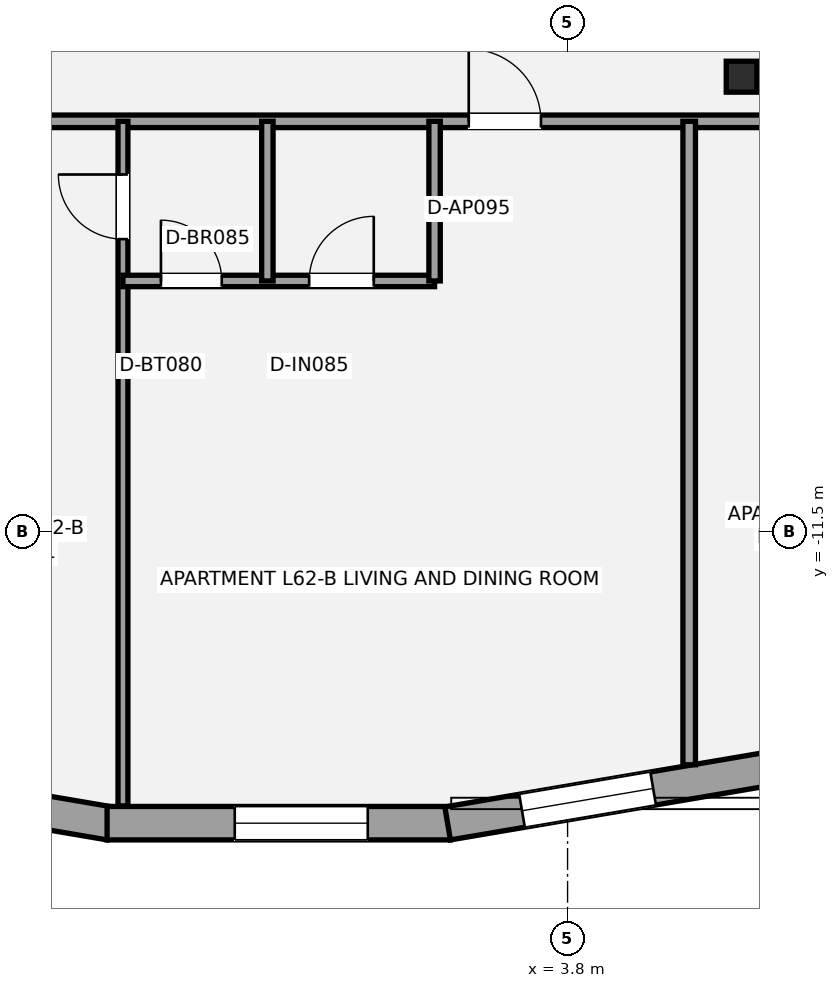
"""IFC4 building model, lengths in metres.
Left out: names, types, materials, properties, quantities, classifications, styles, units other than length and angle.
Written with IfcOpenShell. Run it as: python <this file> out.ifc"""

import sys

from ifc_helpers import new_model, si_unit, direction, frame, frame_2d, origin, origin_2d, place, context, subcontext, project, spatial, rectangle, i_section, extrude, element, fill, save


model = new_model("IFC4")
c1 = context("Model", 3, precision=1e-05, world=origin(), true_north=direction((0.0, 1.0)))
c2 = subcontext(c1, "Body", "Model", "MODEL_VIEW")
j1 = project(units=[si_unit("LENGTHUNIT", "METRE"), si_unit("PLANEANGLEUNIT", "RADIAN")], contexts=[c1])
p1 = place(None, origin())
s1 = spatial("IfcSite", under=j1, at=p1, CompositionType="ELEMENT")
p2 = place(p1, origin())
s2 = spatial("IfcBuilding", under=s1, at=p2, CompositionType="ELEMENT")
p3 = place(p2, frame((0.0, 0.0, 222.6)))
s3 = spatial("IfcBuildingStorey", under=s2, at=p3, CompositionType="ELEMENT", Elevation=222.6)
p4 = place(p3, frame((6.09, -5.513, 0.0), z_axis=(0.0, 0.0, 1.0), x_axis=(1.0, 0.0, 0.0)))
e1 = element("IfcColumn", 1, at=p4, inside=s3, PredefinedType="COLUMN", context=c2, shape_type="SweptSolid", body=[
    extrude(i_section(OverallWidth=0.404, OverallDepth=0.407, WebThickness=0.027, FlangeThickness=0.044, at=origin_2d()), origin(), (0.0, 0.0, 1.0), 3.15),
])
p5 = place(p3, frame((-2.222, -15.337, 0.0), z_axis=(0.0, 0.0, 1.0), x_axis=(-0.985849288176, 0.16763406874, 0.0)))
e2 = element("IfcWall", 2, at=p5, inside=s3, PredefinedType="STANDARD", context=c2, shape_type="SweptSolid", body=[
    extrude(rectangle(XDim=4.429, YDim=0.44, at=frame_2d((2.214, 0.0))), origin(), (0.0, 0.0, 1.0), 2.336),
])
p6 = place(p5, frame((1.764, 0.0, 0.58)))
e3 = element("IfcOpeningElement", 3, at=p6, cuts=e2, PredefinedType="OPENING", context=c2, shape_type="SweptSolid", body=[
    extrude(rectangle(XDim=0.9, YDim=1.35, at=frame_2d((0.45, 0.675))), frame((0.0, 0.23, 0.0), z_axis=(0.0, -1.0, 0.0), x_axis=(1.0, 0.0, 0.0)), (0.0, 0.0, 1.0), 0.46),
])
p7 = place(p3, frame((2.259, -15.334, 0.0), z_axis=(0.0, 0.0, 1.0), x_axis=(-1.0, 0.0, 0.0)))
e4 = element("IfcWall", 4, at=p7, inside=s3, PredefinedType="STANDARD", context=c2, shape_type="SweptSolid", body=[
    extrude(rectangle(XDim=4.518, YDim=0.44, at=frame_2d((2.259, 0.0))), origin(), (0.0, 0.0, 1.0), 2.336),
])
p8 = place(p7, frame((1.088, 0.0, 0.55)))
e5 = element("IfcOpeningElement", 5, at=p8, cuts=e4, PredefinedType="OPENING", context=c2, shape_type="SweptSolid", body=[
    extrude(rectangle(XDim=1.75, YDim=1.55, at=frame_2d((0.875, 0.775))), frame((0.0, 0.23, 0.0), z_axis=(0.0, -1.0, 0.0), x_axis=(1.0, 0.0, 0.0)), (0.0, 0.0, 1.0), 0.46),
])
p9 = place(p3, frame((6.588, -14.594, 0.0), z_axis=(0.0, 0.0, 1.0), x_axis=(-0.985849288176, -0.16763406874, 0.0)))
e6 = element("IfcWall", 6, at=p9, inside=s3, PredefinedType="STANDARD", context=c2, shape_type="SweptSolid", body=[
    extrude(rectangle(XDim=4.429, YDim=0.44, at=frame_2d((2.214, 0.0))), origin(), (0.0, 0.0, 1.0), 2.336),
])
p10 = place(p9, frame((1.686, 0.0, 0.55)))
e7 = element("IfcOpeningElement", 7, at=p10, cuts=e6, PredefinedType="OPENING", context=c2, shape_type="SweptSolid", body=[
    extrude(rectangle(XDim=1.75, YDim=1.55, at=frame_2d((0.875, 0.775))), frame((0.0, 0.23, 0.0), z_axis=(0.0, -1.0, 0.0), x_axis=(1.0, 0.0, 0.0)), (0.0, 0.0, 1.0), 0.46),
])
p11 = place(p3, frame((-20.123, -6.1, 0.0), z_axis=(0.0, 0.0, 1.0), x_axis=(1.0, 0.0, 0.0)))
e8 = element("IfcWall", 8, at=p11, inside=s3, PredefinedType="PARTITIONING", context=c2, shape_type="SweptSolid", body=[
    extrude(rectangle(XDim=40.247, YDim=0.165, at=frame_2d((20.123, 0.0))), origin(), (0.0, 0.0, 1.0), 2.423),
])
p12 = place(p11, frame((1.275, 0.0, 0.0)))
e9 = element("IfcOpeningElement", 9, at=p12, cuts=e8, PredefinedType="OPENING", context=c2, shape_type="SweptSolid", body=[
    extrude(rectangle(XDim=1.0, YDim=2.15, at=frame_2d((0.5, 1.075))), frame((0.0, 0.093, 0.0), z_axis=(0.0, -1.0, 0.0), x_axis=(1.0, 0.0, 0.0)), (0.0, 0.0, 1.0), 0.185),
])
p13 = place(p11, frame((37.922, 0.0, 0.0)))
e10 = element("IfcOpeningElement", 10, at=p13, cuts=e8, PredefinedType="OPENING", context=c2, shape_type="SweptSolid", body=[
    extrude(rectangle(XDim=1.0, YDim=2.15, at=frame_2d((0.5, 1.075))), frame((0.0, 0.093, 0.0), z_axis=(0.0, -1.0, 0.0), x_axis=(1.0, 0.0, 0.0)), (0.0, 0.0, 1.0), 0.185),
])
p14 = place(p11, frame((11.813, 0.0, 0.0)))
e11 = element("IfcOpeningElement", 11, at=p14, cuts=e8, PredefinedType="OPENING", context=c2, shape_type="SweptSolid", body=[
    extrude(rectangle(XDim=0.95, YDim=2.15, at=frame_2d((0.475, 1.075))), frame((0.0, 0.093, 0.0), z_axis=(0.0, -1.0, 0.0), x_axis=(1.0, 0.0, 0.0)), (0.0, 0.0, 1.0), 0.185),
])
p15 = place(p11, frame((22.623, 0.0, 0.0)))
e12 = element("IfcOpeningElement", 12, at=p15, cuts=e8, PredefinedType="OPENING", context=c2, shape_type="SweptSolid", body=[
    extrude(rectangle(XDim=0.95, YDim=2.15, at=frame_2d((0.475, 1.075))), frame((0.0, 0.093, 0.0), z_axis=(0.0, -1.0, 0.0), x_axis=(1.0, 0.0, 0.0)), (0.0, 0.0, 1.0), 0.185),
])
p16 = place(p11, frame((33.423, 0.0, 0.0)))
e13 = element("IfcOpeningElement", 13, at=p16, cuts=e8, PredefinedType="OPENING", context=c2, shape_type="SweptSolid", body=[
    extrude(rectangle(XDim=0.95, YDim=2.15, at=frame_2d((0.475, 1.075))), frame((0.0, 0.093, 0.0), z_axis=(0.0, -1.0, 0.0), x_axis=(1.0, 0.0, 0.0)), (0.0, 0.0, 1.0), 0.185),
])
p17 = place(p3, frame((5.4, -14.565, 0.0), z_axis=(0.0, 0.0, 1.0), x_axis=(0.0, 1.0, 0.0)))
e14 = element("IfcWall", 14, at=p17, inside=s3, PredefinedType="PARTITIONING", context=c2, shape_type="SweptSolid", body=[
    extrude(rectangle(XDim=8.465, YDim=0.165, at=frame_2d((4.232, 0.0))), origin(), (0.0, 0.0, 1.0), 2.423),
])
p18 = place(p3, frame((-2.05, -15.106, 0.0), z_axis=(0.0, 0.0, 1.0), x_axis=(0.0, 1.0, 0.0)))
e15 = element("IfcWall", 15, at=p18, inside=s3, PredefinedType="PARTITIONING", context=c2, shape_type="SweptSolid", body=[
    extrude(rectangle(XDim=9.006, YDim=0.13, at=frame_2d((4.503, 0.0))), origin(), (0.0, 0.0, 1.0), 2.423),
])
p19 = place(p18, frame((7.456, 0.0, 0.0)))
e16 = element("IfcOpeningElement", 16, at=p19, cuts=e15, PredefinedType="OPENING", context=c2, shape_type="SweptSolid", body=[
    extrude(rectangle(XDim=0.85, YDim=2.1, at=frame_2d((0.425, 1.05))), frame((0.0, 0.075, 0.0), z_axis=(0.0, -1.0, 0.0), x_axis=(1.0, 0.0, 0.0)), (0.0, 0.0, 1.0), 0.15),
])
p20 = place(p3, frame((-2.05, -8.2, 0.0), z_axis=(0.0, 0.0, 1.0), x_axis=(1.0, 0.0, 0.0)))
e17 = element("IfcWall", 17, at=p20, inside=s3, PredefinedType="PLUMBINGWALL", context=c2, shape_type="SweptSolid", body=[
    extrude(rectangle(XDim=4.1, YDim=0.15, at=frame_2d((2.05, 0.0))), origin(), (0.0, 0.0, 1.0), 2.423),
])
p21 = place(p20, frame((0.5, 0.0, 0.0)))
e18 = element("IfcOpeningElement", 18, at=p21, cuts=e17, PredefinedType="OPENING", context=c2, shape_type="SweptSolid", body=[
    extrude(rectangle(XDim=0.8, YDim=2.1, at=frame_2d((0.4, 1.05))), frame((0.0, 0.085, 0.0), z_axis=(0.0, -1.0, 0.0), x_axis=(1.0, 0.0, 0.0)), (0.0, 0.0, 1.0), 0.17),
])
p22 = place(p20, frame((2.45, 0.0, 0.0)))
e19 = element("IfcOpeningElement", 19, at=p22, cuts=e17, PredefinedType="OPENING", context=c2, shape_type="SweptSolid", body=[
    extrude(rectangle(XDim=0.85, YDim=2.1, at=frame_2d((0.425, 1.05))), frame((0.0, 0.085, 0.0), z_axis=(0.0, -1.0, 0.0), x_axis=(1.0, 0.0, 0.0)), (0.0, 0.0, 1.0), 0.17),
])
p23 = place(p3, frame((-0.15, -8.2, 0.0), z_axis=(0.0, 0.0, 1.0), x_axis=(0.0, 1.0, 0.0)))
e20 = element("IfcWall", 20, at=p23, inside=s3, PredefinedType="PLUMBINGWALL", context=c2, shape_type="SweptSolid", body=[
    extrude(rectangle(XDim=2.1, YDim=0.15, at=frame_2d((1.05, 0.0))), origin(), (0.0, 0.0, 1.0), 2.423),
])
p24 = place(p3, frame((2.05, -8.2, 0.0), z_axis=(0.0, 0.0, 1.0), x_axis=(0.0, 1.0, 0.0)))
e21 = element("IfcWall", 21, at=p24, inside=s3, PredefinedType="PLUMBINGWALL", context=c2, shape_type="SweptSolid", body=[
    extrude(rectangle(XDim=2.1, YDim=0.15, at=frame_2d((1.05, 0.0))), origin(), (0.0, 0.0, 1.0), 2.97),
])
p25 = place(p8, origin())
e22 = element("IfcWindow", 22, at=p25, inside=s3, PartitioningType="SINGLE_PANEL", PredefinedType="WINDOW", context=c2, shape_type="SweptSolid", body=[
    extrude(rectangle(XDim=1.75, YDim=1.55, at=frame_2d((0.875, 0.775))), frame((0.0, -0.01, 0.0), z_axis=(0.0, -1.0, 0.0), x_axis=(1.0, 0.0, 0.0)), (0.0, 0.0, 1.0), 0.06),
])
fill(e5, e22)
p26 = place(p10, origin())
e23 = element("IfcWindow", 23, at=p26, inside=s3, PartitioningType="SINGLE_PANEL", PredefinedType="WINDOW", context=c2, shape_type="SweptSolid", body=[
    extrude(rectangle(XDim=1.75, YDim=1.55, at=frame_2d((0.875, 0.775))), frame((0.0, -0.01, 0.0), z_axis=(0.0, -1.0, 0.0), x_axis=(1.0, 0.0, 0.0)), (0.0, 0.0, 1.0), 0.06),
])
fill(e7, e23)
p27 = place(p19, origin())
e24 = element("IfcDoor", 24, at=p27, inside=s3, OperationType="SINGLE_SWING_RIGHT", PredefinedType="DOOR", context=c2, shape_type="SweptSolid", body=[
    extrude(rectangle(XDim=0.85, YDim=2.1, at=frame_2d((0.425, 1.05))), frame((0.0, 0.025, 0.0), z_axis=(0.0, -1.0, 0.0), x_axis=(1.0, 0.0, 0.0)), (0.0, 0.0, 1.0), 0.05),
])
fill(e16, e24)
p28 = place(p21, origin())
e25 = element("IfcDoor", 25, at=p28, inside=s3, OperationType="SINGLE_SWING_LEFT", PredefinedType="DOOR", context=c2, shape_type="SweptSolid", body=[
    extrude(rectangle(XDim=0.8, YDim=2.1, at=frame_2d((0.4, 1.05))), frame((0.0, 0.025, 0.0), z_axis=(0.0, -1.0, 0.0), x_axis=(1.0, 0.0, 0.0)), (0.0, 0.0, 1.0), 0.05),
])
fill(e18, e25)
p29 = place(p22, origin())
e26 = element("IfcDoor", 26, at=p29, inside=s3, OperationType="SINGLE_SWING_RIGHT", PredefinedType="DOOR", context=c2, shape_type="SweptSolid", body=[
    extrude(rectangle(XDim=0.85, YDim=2.1, at=frame_2d((0.425, 1.05))), frame((0.0, 0.025, 0.0), z_axis=(0.0, -1.0, 0.0), x_axis=(1.0, 0.0, 0.0)), (0.0, 0.0, 1.0), 0.05),
])
fill(e19, e26)
p30 = place(p15, origin())
e27 = element("IfcDoor", 27, at=p30, inside=s3, OperationType="SINGLE_SWING_LEFT", PredefinedType="DOOR", context=c2, shape_type="SweptSolid", body=[
    extrude(rectangle(XDim=0.95, YDim=2.15, at=frame_2d((0.475, 1.075))), frame((0.0, 0.025, 0.0), z_axis=(0.0, -1.0, 0.0), x_axis=(1.0, 0.0, 0.0)), (0.0, 0.0, 1.0), 0.05),
])
fill(e12, e27)
save(model, sys.argv[1])
